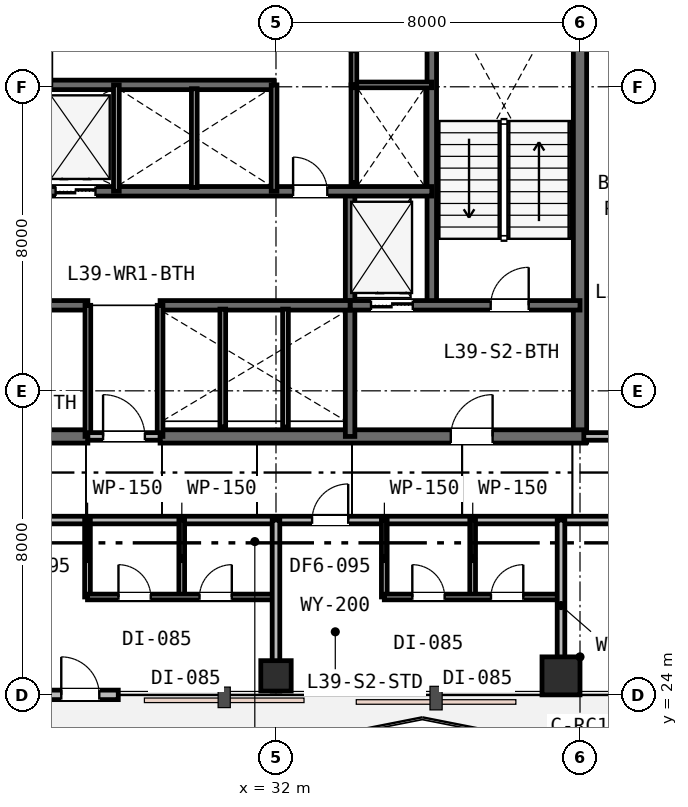
"""IFC4 building model, lengths in metres.
Left out: names, types, materials, properties, quantities, classifications, styles, units other than length and angle.
Written with IfcOpenShell. Run it as: python <this file> out.ifc"""

import sys

from ifc_helpers import new_model, si_unit, direction, frame, frame_2d, origin, origin_2d, place, context, subcontext, project, spatial, rectangle, extrude, element, fill, save


model = new_model("IFC4")
c1 = context("Model", 3, precision=1e-05, world=origin(), true_north=direction((0.0, 1.0)))
c2 = subcontext(c1, "Body", "Model", "MODEL_VIEW")
j1 = project(units=[si_unit("LENGTHUNIT", "METRE"), si_unit("PLANEANGLEUNIT", "RADIAN")], contexts=[c1])
p1 = place(None, origin())
s1 = spatial("IfcSite", under=j1, at=p1, CompositionType="ELEMENT")
p2 = place(p1, origin())
s2 = spatial("IfcBuilding", under=s1, at=p2, CompositionType="ELEMENT")
p3 = place(p2, frame((0.0, 0.0, 154.2)))
s3 = spatial("IfcBuildingStorey", under=s2, at=p3, CompositionType="ELEMENT", Elevation=154.2)
p4 = place(p3, frame((40.0, 30.65, 0.0), z_axis=(0.0, 0.0, 1.0), x_axis=(0.0, 1.0, 0.0)))
e1 = element("IfcWall", 1, at=p4, inside=s3, PredefinedType="SHEAR", context=c2, shape_type="SweptSolid", body=[
    extrude(rectangle(XDim=12.3, YDim=0.35, at=frame_2d((6.15, 0.0))), origin(), (0.0, 0.0, 1.0), 3.6),
])
p5 = place(p3, frame((15.85, 30.8, 0.0), z_axis=(0.0, 0.0, 1.0), x_axis=(1.0, 0.0, 0.0)))
e2 = element("IfcWall", 2, at=p5, inside=s3, PredefinedType="SHEAR", context=c2, shape_type="SweptSolid", body=[
    extrude(rectangle(XDim=11.2, YDim=0.35, at=frame_2d((5.6, 0.0))), origin(), (0.0, 0.0, 1.0), 3.6),
])
p6 = place(p5, frame((2.45, 0.0, 0.0)))
e3 = element("IfcOpeningElement", 3, at=p6, cuts=e2, PredefinedType="OPENING", context=c2, shape_type="SweptSolid", body=[
    extrude(rectangle(XDim=1.1, YDim=2.15, at=frame_2d((0.55, 1.075))), frame((0.0, 0.185, 0.0), z_axis=(0.0, -1.0, 0.0), x_axis=(1.0, 0.0, 0.0)), (0.0, 0.0, 1.0), 0.37),
])
p7 = place(p3, frame((28.95, 30.8, 0.0), z_axis=(0.0, 0.0, 1.0), x_axis=(1.0, 0.0, 0.0)))
e4 = element("IfcWall", 4, at=p7, inside=s3, PredefinedType="SHEAR", context=c2, shape_type="SweptSolid", body=[
    extrude(rectangle(XDim=11.2, YDim=0.35, at=frame_2d((5.6, 0.0))), origin(), (0.0, 0.0, 1.0), 3.6),
])
p8 = place(p7, frame((7.65, 0.0, 0.0)))
e5 = element("IfcOpeningElement", 5, at=p8, cuts=e4, PredefinedType="OPENING", context=c2, shape_type="SweptSolid", body=[
    extrude(rectangle(XDim=1.1, YDim=2.15, at=frame_2d((0.55, 1.075))), frame((0.0, 0.185, 0.0), z_axis=(0.0, -1.0, 0.0), x_axis=(1.0, 0.0, 0.0)), (0.0, 0.0, 1.0), 0.37),
])
p9 = place(p3, frame((36.1, 34.25, 0.0), z_axis=(0.0, 0.0, 1.0), x_axis=(0.0, 1.0, 0.0)))
e6 = element("IfcWall", 6, at=p9, inside=s3, PredefinedType="SHEAR", context=c2, shape_type="SweptSolid", body=[
    extrude(rectangle(XDim=8.65, YDim=0.25, at=frame_2d((4.325, 0.0))), origin(), (0.0, 0.0, 1.0), 3.6),
])
p10 = place(p3, frame((33.95, 30.8, 0.0), z_axis=(0.0, 0.0, 1.0), x_axis=(0.0, 1.0, 0.0)))
e7 = element("IfcWall", 7, at=p10, inside=s3, PredefinedType="SHEAR", context=c2, shape_type="SweptSolid", body=[
    extrude(rectangle(XDim=6.45, YDim=0.25, at=frame_2d((3.225, 0.0))), origin(), (0.0, 0.0, 1.0), 3.6),
])
p11 = place(p3, frame((33.95, 34.25, 0.0), z_axis=(0.0, 0.0, 1.0), x_axis=(1.0, 0.0, 0.0)))
e8 = element("IfcWall", 8, at=p11, inside=s3, PredefinedType="SHEAR", context=c2, shape_type="SweptSolid", body=[
    extrude(rectangle(XDim=6.05, YDim=0.25, at=frame_2d((3.025, 0.0))), origin(), (0.0, 0.0, 1.0), 3.6),
])
p12 = place(p11, frame((3.7, 0.0, 0.0)))
e9 = element("IfcOpeningElement", 9, at=p12, cuts=e8, PredefinedType="OPENING", context=c2, shape_type="SweptSolid", body=[
    extrude(rectangle(XDim=1.0, YDim=2.15, at=frame_2d((0.5, 1.075))), frame((0.0, 0.135, 0.0), z_axis=(0.0, -1.0, 0.0), x_axis=(1.0, 0.0, 0.0)), (0.0, 0.0, 1.0), 0.27),
])
p13 = place(p11, frame((0.55, 0.0, 0.0)))
e10 = element("IfcOpeningElement", 10, at=p13, cuts=e8, PredefinedType="OPENING", context=c2, shape_type="SweptSolid", body=[
    extrude(rectangle(XDim=1.1, YDim=2.15, at=frame_2d((0.55, 1.075))), frame((0.0, 0.135, 0.0), z_axis=(0.0, -1.0, 0.0), x_axis=(1.0, 0.0, 0.0)), (0.0, 0.0, 1.0), 0.27),
])
p14 = place(p3, frame((22.05, 34.25, 0.0), z_axis=(0.0, 0.0, 1.0), x_axis=(1.0, 0.0, 0.0)))
e11 = element("IfcWall", 11, at=p14, inside=s3, PredefinedType="SHEAR", context=c2, shape_type="SweptSolid", body=[
    extrude(rectangle(XDim=5.0, YDim=0.25, at=frame_2d((2.5, 0.0))), origin(), (0.0, 0.0, 1.0), 3.6),
])
p15 = place(p14, frame((1.95, 0.0, 0.0)))
e12 = element("IfcOpeningElement", 12, at=p15, cuts=e11, PredefinedType="OPENING", context=c2, shape_type="SweptSolid", body=[
    extrude(rectangle(XDim=1.0, YDim=2.15, at=frame_2d((0.5, 1.075))), frame((0.0, 0.135, 0.0), z_axis=(0.0, -1.0, 0.0), x_axis=(1.0, 0.0, 0.0)), (0.0, 0.0, 1.0), 0.27),
])
p16 = place(p3, frame((28.95, 34.25, 0.0), z_axis=(0.0, 0.0, 1.0), x_axis=(1.0, 0.0, 0.0)))
e13 = element("IfcWall", 13, at=p16, inside=s3, PredefinedType="SHEAR", context=c2, shape_type="SweptSolid", body=[
    extrude(rectangle(XDim=5.0, YDim=0.25, at=frame_2d((2.5, 0.0))), origin(), (0.0, 0.0, 1.0), 3.6),
])
p17 = place(p3, frame((19.9, 37.25, 0.0), z_axis=(0.0, 0.0, 1.0), x_axis=(1.0, 0.0, 0.0)))
e14 = element("IfcWall", 14, at=p17, inside=s3, PredefinedType="SHEAR", context=c2, shape_type="SweptSolid", body=[
    extrude(rectangle(XDim=16.2, YDim=0.25, at=frame_2d((8.1, 0.0))), origin(), (0.0, 0.0, 1.0), 3.6),
])
p18 = place(p17, frame((12.55, 0.0, 0.0)))
e15 = element("IfcOpeningElement", 15, at=p18, cuts=e14, PredefinedType="OPENING", context=c2, shape_type="SweptSolid", body=[
    extrude(rectangle(XDim=0.9, YDim=2.15, at=frame_2d((0.45, 1.075))), frame((0.0, 0.135, 0.0), z_axis=(0.0, -1.0, 0.0), x_axis=(1.0, 0.0, 0.0)), (0.0, 0.0, 1.0), 0.27),
])
p19 = place(p17, frame((2.5, 0.0, 0.0)))
e16 = element("IfcOpeningElement", 16, at=p19, cuts=e14, PredefinedType="OPENING", context=c2, shape_type="SweptSolid", body=[
    extrude(rectangle(XDim=1.05, YDim=2.15, at=frame_2d((0.525, 1.075))), frame((0.0, 0.135, 0.0), z_axis=(0.0, -1.0, 0.0), x_axis=(1.0, 0.0, 0.0)), (0.0, 0.0, 1.0), 0.27),
])
p20 = place(p17, frame((4.4, 0.0, 0.0)))
e17 = element("IfcOpeningElement", 17, at=p20, cuts=e14, PredefinedType="OPENING", context=c2, shape_type="SweptSolid", body=[
    extrude(rectangle(XDim=1.05, YDim=2.15, at=frame_2d((0.525, 1.075))), frame((0.0, 0.135, 0.0), z_axis=(0.0, -1.0, 0.0), x_axis=(1.0, 0.0, 0.0)), (0.0, 0.0, 1.0), 0.27),
])
p21 = place(p17, frame((6.3, 0.0, 0.0)))
e18 = element("IfcOpeningElement", 18, at=p21, cuts=e14, PredefinedType="OPENING", context=c2, shape_type="SweptSolid", body=[
    extrude(rectangle(XDim=1.05, YDim=2.15, at=frame_2d((0.525, 1.075))), frame((0.0, 0.135, 0.0), z_axis=(0.0, -1.0, 0.0), x_axis=(1.0, 0.0, 0.0)), (0.0, 0.0, 1.0), 0.27),
])
p22 = place(p3, frame((19.9, 40.05, 0.0), z_axis=(0.0, 0.0, 1.0), x_axis=(1.0, 0.0, 0.0)))
e19 = element("IfcWall", 19, at=p22, inside=s3, PredefinedType="SHEAR", context=c2, shape_type="SweptSolid", body=[
    extrude(rectangle(XDim=12.05, YDim=0.25, at=frame_2d((6.025, 0.0))), origin(), (0.0, 0.0, 1.0), 3.6),
])
p23 = place(p3, frame((32.0, 24.5, 0.0), z_axis=(0.0, 0.0, 1.0), x_axis=(1.0, 0.0, 0.0)))
e20 = element("IfcColumn", 20, at=p23, inside=s3, PredefinedType="COLUMN", context=c2, shape_type="SweptSolid", body=[
    extrude(rectangle(XDim=0.8, YDim=0.8, at=origin_2d()), origin(), (0.0, 0.0, 1.0), 3.6),
])
p24 = place(p3, frame((39.5, 24.5, 0.0), z_axis=(0.0, 0.0, 1.0), x_axis=(1.0, 0.0, 0.0)))
e21 = element("IfcColumn", 21, at=p24, inside=s3, PredefinedType="COLUMN", context=c2, shape_type="SweptSolid", body=[
    extrude(rectangle(XDim=1.0, YDim=1.0, at=origin_2d()), origin(), (0.0, 0.0, 1.0), 3.6),
])
p25 = place(p3, frame((25.85, 24.0, 0.0), z_axis=(0.0, 0.0, 1.0), x_axis=(1.0, 0.0, 0.0)))
e22 = element("IfcWall", 22, at=p25, inside=s3, PredefinedType="STANDARD", context=c2, shape_type="SweptSolid", body=[
    extrude(rectangle(XDim=2.0, YDim=0.25, at=frame_2d((1.0, 0.0))), origin(), (0.0, 0.0, 1.0), 3.01),
])
p26 = place(p25, frame((0.5, 0.0, 0.0)))
e23 = element("IfcOpeningElement", 23, at=p26, cuts=e22, PredefinedType="OPENING", context=c2, shape_type="SweptSolid", body=[
    extrude(rectangle(XDim=1.0, YDim=2.15, at=frame_2d((0.5, 1.075))), frame((0.0, 0.135, 0.0), z_axis=(0.0, -1.0, 0.0), x_axis=(1.0, 0.0, 0.0)), (0.0, 0.0, 1.0), 0.27),
])
for number, where, z_axis, x_axis in (
    (24, (27.05, 30.8, 0.0), (0.0, 0.0, 1.0), (0.0, 1.0, 0.0)),
    (25, (28.95, 30.8, 0.0), (0.0, 0.0, 1.0), (0.0, 1.0, 0.0)),
):
    element("IfcWall", number, at=place(p3, frame(where, z_axis=z_axis, x_axis=x_axis)), inside=s3, PredefinedType="PLUMBINGWALL", context=c2, shape_type="SweptSolid", body=[
        extrude(rectangle(XDim=3.45, YDim=0.15, at=frame_2d((1.725, 0.0))), origin(), (0.0, 0.0, 1.0), 2.96),
    ])
p27 = place(p3, frame((27.05, 30.8, 0.0), z_axis=(0.0, 0.0, 1.0), x_axis=(1.0, 0.0, 0.0)))
e26 = element("IfcWall", 26, at=p27, inside=s3, PredefinedType="PARTITIONING", context=c2, shape_type="SweptSolid", body=[
    extrude(rectangle(XDim=1.9, YDim=0.2, at=frame_2d((0.95, 0.0))), origin(), (0.0, 0.0, 1.0), 2.96),
])
p28 = place(p27, frame((0.4, 0.0, 0.0)))
e27 = element("IfcOpeningElement", 27, at=p28, cuts=e26, PredefinedType="OPENING", context=c2, shape_type="SweptSolid", body=[
    extrude(rectangle(XDim=1.1, YDim=2.15, at=frame_2d((0.55, 1.075))), frame((0.0, 0.11, 0.0), z_axis=(0.0, -1.0, 0.0), x_axis=(1.0, 0.0, 0.0)), (0.0, 0.0, 1.0), 0.22),
])
p29 = place(p3, frame((30.6, 31.05, 0.0), z_axis=(0.0, 0.0, 1.0), x_axis=(0.0, 1.0, 0.0)))
e28 = element("IfcWall", 28, at=p29, inside=s3, PredefinedType="PLUMBINGWALL", context=c2, shape_type="SweptSolid", body=[
    extrude(rectangle(XDim=3.1, YDim=0.15, at=frame_2d((1.55, 0.0))), origin(), (0.0, 0.0, 1.0), 3.33),
])
p30 = place(p3, frame((32.25, 31.05, 0.0), z_axis=(0.0, 0.0, 1.0), x_axis=(0.0, 1.0, 0.0)))
e29 = element("IfcWall", 29, at=p30, inside=s3, PredefinedType="PLUMBINGWALL", context=c2, shape_type="SweptSolid", body=[
    extrude(rectangle(XDim=3.1, YDim=0.15, at=frame_2d((1.55, 0.0))), origin(), (0.0, 0.0, 1.0), 2.93),
])
for number, where, z_axis, x_axis in (
    (30, (27.8, 37.25, 0.0), (0.0, 0.0, 1.0), (0.0, 1.0, 0.0)),
    (31, (31.95, 37.25, 0.0), (0.0, 0.0, 1.0), (0.0, 1.0, 0.0)),
):
    element("IfcWall", number, at=place(p3, frame(where, z_axis=z_axis, x_axis=x_axis)), inside=s3, PredefinedType="PLUMBINGWALL", context=c2, shape_type="SweptSolid", body=[
        extrude(rectangle(XDim=2.8, YDim=0.15, at=frame_2d((1.4, 0.0))), origin(), (0.0, 0.0, 1.0), 3.33),
    ])
p31 = place(p3, frame((29.85, 37.35, 0.0), z_axis=(0.0, 0.0, 1.0), x_axis=(0.0, 1.0, 0.0)))
e32 = element("IfcWall", 32, at=p31, inside=s3, PredefinedType="PLUMBINGWALL", context=c2, shape_type="SweptSolid", body=[
    extrude(rectangle(XDim=2.6, YDim=0.15, at=frame_2d((1.3, 0.0))), origin(), (0.0, 0.0, 1.0), 3.33),
])
p32 = place(p3, frame((34.05, 37.473, 0.0), z_axis=(0.0, 0.0, 1.0), x_axis=(0.0, 1.0, 0.0)))
e33 = element("IfcWall", 33, at=p32, inside=s3, PredefinedType="PLUMBINGWALL", context=c2, shape_type="SweptSolid", body=[
    extrude(rectangle(XDim=2.577, YDim=0.15, at=frame_2d((1.288, 0.0))), origin(), (0.0, 0.0, 1.0), 3.33),
])
p33 = place(p3, frame((34.05, 40.05, 0.0), z_axis=(0.0, 0.0, 1.0), x_axis=(1.0, 0.0, 0.0)))
e34 = element("IfcWall", 34, at=p33, inside=s3, PredefinedType="PARTITIONING", context=c2, shape_type="SweptSolid", body=[
    extrude(rectangle(XDim=2.05, YDim=0.15, at=frame_2d((1.025, 0.0))), origin(), (0.0, 0.0, 1.0), 3.33),
])
p34 = place(p3, frame((34.05, 40.05, 0.0), z_axis=(0.0, 0.0, 1.0), x_axis=(0.0, 1.0, 0.0)))
e35 = element("IfcWall", 35, at=p34, inside=s3, PredefinedType="PARTITIONING", context=c2, shape_type="SweptSolid", body=[
    extrude(rectangle(XDim=2.85, YDim=0.15, at=frame_2d((1.425, 0.0))), origin(), (0.0, 0.0, 1.0), 3.33),
])
p35 = place(p34, frame((0.865, 0.0, 0.0)))
e36 = element("IfcOpeningElement", 36, at=p35, cuts=e35, PredefinedType="OPENING", context=c2, shape_type="SweptSolid", body=[
    extrude(rectangle(XDim=0.9, YDim=2.15, at=frame_2d((0.45, 1.075))), frame((0.0, 0.085, 0.0), z_axis=(0.0, -1.0, 0.0), x_axis=(1.0, 0.0, 0.0)), (0.0, 0.0, 1.0), 0.17),
])
p36 = place(p3, frame((19.6, 28.6, 0.0), z_axis=(0.0, 0.0, 1.0), x_axis=(1.0, 0.0, 0.0)))
e37 = element("IfcWall", 37, at=p36, inside=s3, PredefinedType="PARTITIONING", context=c2, shape_type="SweptSolid", body=[
    extrude(rectangle(XDim=31.3, YDim=0.2, at=frame_2d((15.65, 0.0))), origin(), (0.0, 0.0, 1.0), 2.93),
])
p37 = place(p36, frame((5.445, 0.0, 0.0)))
e38 = element("IfcOpeningElement", 38, at=p37, cuts=e37, PredefinedType="OPENING", context=c2, shape_type="SweptSolid", body=[
    extrude(rectangle(XDim=0.95, YDim=2.15, at=frame_2d((0.475, 1.075))), frame((0.0, 0.11, 0.0), z_axis=(0.0, -1.0, 0.0), x_axis=(1.0, 0.0, 0.0)), (0.0, 0.0, 1.0), 0.22),
])
p38 = place(p36, frame((13.35, 0.0, 0.0)))
e39 = element("IfcOpeningElement", 39, at=p38, cuts=e37, PredefinedType="OPENING", context=c2, shape_type="SweptSolid", body=[
    extrude(rectangle(XDim=0.95, YDim=2.15, at=frame_2d((0.475, 1.075))), frame((0.0, 0.11, 0.0), z_axis=(0.0, -1.0, 0.0), x_axis=(1.0, 0.0, 0.0)), (0.0, 0.0, 1.0), 0.22),
])
p39 = place(p36, frame((21.925, 0.0, 0.0)))
e40 = element("IfcOpeningElement", 40, at=p39, cuts=e37, PredefinedType="OPENING", context=c2, shape_type="SweptSolid", body=[
    extrude(rectangle(XDim=0.95, YDim=2.15, at=frame_2d((0.475, 1.075))), frame((0.0, 0.11, 0.0), z_axis=(0.0, -1.0, 0.0), x_axis=(1.0, 0.0, 0.0)), (0.0, 0.0, 1.0), 0.22),
])
p40 = place(p3, frame((40.1, 30.8, 0.0), z_axis=(0.0, 0.0, 1.0), x_axis=(1.0, 0.0, 0.0)))
e41 = element("IfcWall", 41, at=p40, inside=s3, PredefinedType="PARTITIONING", context=c2, shape_type="SweptSolid", body=[
    extrude(rectangle(XDim=4.1, YDim=0.2, at=frame_2d((2.05, 0.0))), origin(), (0.0, 0.0, 1.0), 2.93),
])
p41 = place(p40, frame((1.575, 0.0, 0.0)))
e42 = element("IfcOpeningElement", 42, at=p41, cuts=e41, PredefinedType="OPENING", context=c2, shape_type="SweptSolid", body=[
    extrude(rectangle(XDim=0.95, YDim=2.15, at=frame_2d((0.475, 1.075))), frame((0.0, 0.11, 0.0), z_axis=(0.0, -1.0, 0.0), x_axis=(1.0, 0.0, 0.0)), (0.0, 0.0, 1.0), 0.22),
])
for number, where, z_axis, x_axis in (
    (43, (27.04, 26.576, 0.0), (0.0, 0.0, 1.0), (0.0, 1.0, 0.0)),
    (44, (29.52, 26.576, 0.0), (0.0, 0.0, 1.0), (0.0, 1.0, 0.0)),
):
    element("IfcWall", number, at=place(p3, frame(where, z_axis=z_axis, x_axis=x_axis)), inside=s3, PredefinedType="PARTITIONING", context=c2, shape_type="SweptSolid", body=[
        extrude(rectangle(XDim=2.024, YDim=0.15, at=frame_2d((1.012, 0.0))), origin(), (0.0, 0.0, 1.0), 2.96),
    ])
p42 = place(p3, frame((27.04, 26.576, 0.0), z_axis=(0.0, 0.0, 1.0), x_axis=(1.0, 0.0, 0.0)))
e45 = element("IfcWall", 45, at=p42, inside=s3, PredefinedType="PARTITIONING", context=c2, shape_type="SweptSolid", body=[
    extrude(rectangle(XDim=4.96, YDim=0.15, at=frame_2d((2.48, 0.0))), origin(), (0.0, 0.0, 1.0), 2.93),
])
p43 = place(p42, frame((0.815, 0.0, 0.0)))
e46 = element("IfcOpeningElement", 46, at=p43, cuts=e45, PredefinedType="OPENING", context=c2, shape_type="SweptSolid", body=[
    extrude(rectangle(XDim=0.85, YDim=2.15, at=frame_2d((0.425, 1.075))), frame((0.0, 0.085, 0.0), z_axis=(0.0, -1.0, 0.0), x_axis=(1.0, 0.0, 0.0)), (0.0, 0.0, 1.0), 0.17),
])
p44 = place(p42, frame((2.947, 0.0, 0.0)))
e47 = element("IfcOpeningElement", 47, at=p44, cuts=e45, PredefinedType="OPENING", context=c2, shape_type="SweptSolid", body=[
    extrude(rectangle(XDim=0.85, YDim=2.15, at=frame_2d((0.425, 1.075))), frame((0.0, 0.085, 0.0), z_axis=(0.0, -1.0, 0.0), x_axis=(1.0, 0.0, 0.0)), (0.0, 0.0, 1.0), 0.17),
])
p45 = place(p3, frame((32.0, 24.1, 0.0), z_axis=(0.0, 0.0, 1.0), x_axis=(0.0, 1.0, 0.0)))
e48 = element("IfcWall", 48, at=p45, inside=s3, PredefinedType="PARTITIONING", context=c2, shape_type="SweptSolid", body=[
    extrude(rectangle(XDim=4.5, YDim=0.2, at=frame_2d((2.25, 0.0))), origin(), (0.0, 0.0, 1.0), 2.93),
])
for number, where, z_axis, x_axis in (
    (49, (34.85, 26.576, 0.0), (0.0, 0.0, 1.0), (0.0, 1.0, 0.0)),
    (50, (37.175, 26.576, 0.0), (0.0, 0.0, 1.0), (0.0, 1.0, 0.0)),
):
    element("IfcWall", number, at=place(p3, frame(where, z_axis=z_axis, x_axis=x_axis)), inside=s3, PredefinedType="PARTITIONING", context=c2, shape_type="SweptSolid", body=[
        extrude(rectangle(XDim=2.024, YDim=0.15, at=frame_2d((1.012, 0.0))), origin(), (0.0, 0.0, 1.0), 2.96),
    ])
p46 = place(p3, frame((34.85, 26.576, 0.0), z_axis=(0.0, 0.0, 1.0), x_axis=(1.0, 0.0, 0.0)))
e51 = element("IfcWall", 51, at=p46, inside=s3, PredefinedType="PARTITIONING", context=c2, shape_type="SweptSolid", body=[
    extrude(rectangle(XDim=4.65, YDim=0.15, at=frame_2d((2.325, 0.0))), origin(), (0.0, 0.0, 1.0), 2.93),
])
p47 = place(p46, frame((0.738, 0.0, 0.0)))
e52 = element("IfcOpeningElement", 52, at=p47, cuts=e51, PredefinedType="OPENING", context=c2, shape_type="SweptSolid", body=[
    extrude(rectangle(XDim=0.85, YDim=2.15, at=frame_2d((0.425, 1.075))), frame((0.0, 0.085, 0.0), z_axis=(0.0, -1.0, 0.0), x_axis=(1.0, 0.0, 0.0)), (0.0, 0.0, 1.0), 0.17),
])
p48 = place(p46, frame((2.808, 0.0, 0.0)))
e53 = element("IfcOpeningElement", 53, at=p48, cuts=e51, PredefinedType="OPENING", context=c2, shape_type="SweptSolid", body=[
    extrude(rectangle(XDim=0.85, YDim=2.15, at=frame_2d((0.425, 1.075))), frame((0.0, 0.085, 0.0), z_axis=(0.0, -1.0, 0.0), x_axis=(1.0, 0.0, 0.0)), (0.0, 0.0, 1.0), 0.17),
])
p49 = place(p3, frame((39.5, 24.1, 0.0), z_axis=(0.0, 0.0, 1.0), x_axis=(0.0, 1.0, 0.0)))
e54 = element("IfcWall", 54, at=p49, inside=s3, PredefinedType="PARTITIONING", context=c2, shape_type="SweptSolid", body=[
    extrude(rectangle(XDim=4.5, YDim=0.2, at=frame_2d((2.25, 0.0))), origin(), (0.0, 0.0, 1.0), 2.93),
])
p50 = place(p26, origin())
e55 = element("IfcDoor", 55, at=p50, inside=s3, OperationType="SINGLE_SWING_LEFT", PredefinedType="DOOR", context=c2, shape_type="SweptSolid", body=[
    extrude(rectangle(XDim=1.0, YDim=2.15, at=frame_2d((0.5, 1.075))), frame((0.0, 0.025, 0.0), z_axis=(0.0, -1.0, 0.0), x_axis=(1.0, 0.0, 0.0)), (0.0, 0.0, 1.0), 0.05),
])
fill(e23, e55)
p51 = place(p28, origin())
e56 = element("IfcDoor", 56, at=p51, inside=s3, OperationType="SINGLE_SWING_LEFT", PredefinedType="DOOR", context=c2, shape_type="SweptSolid", body=[
    extrude(rectangle(XDim=1.1, YDim=2.15, at=frame_2d((0.55, 1.075))), frame((0.0, 0.025, 0.0), z_axis=(0.0, -1.0, 0.0), x_axis=(1.0, 0.0, 0.0)), (0.0, 0.0, 1.0), 0.05),
])
fill(e27, e56)
p52 = place(p12, origin())
e57 = element("IfcDoor", 57, at=p52, inside=s3, OperationType="SINGLE_SWING_RIGHT", PredefinedType="DOOR", context=c2, shape_type="SweptSolid", body=[
    extrude(rectangle(XDim=1.0, YDim=2.15, at=frame_2d((0.5, 1.075))), frame((0.0, 0.025, 0.0), z_axis=(0.0, -1.0, 0.0), x_axis=(1.0, 0.0, 0.0)), (0.0, 0.0, 1.0), 0.05),
])
fill(e9, e57)
p53 = place(p8, origin())
e58 = element("IfcDoor", 58, at=p53, inside=s3, OperationType="SINGLE_SWING_RIGHT", PredefinedType="DOOR", context=c2, shape_type="SweptSolid", body=[
    extrude(rectangle(XDim=1.1, YDim=2.15, at=frame_2d((0.55, 1.075))), frame((0.0, 0.025, 0.0), z_axis=(0.0, -1.0, 0.0), x_axis=(1.0, 0.0, 0.0)), (0.0, 0.0, 1.0), 0.05),
])
fill(e5, e58)
p54 = place(p18, origin())
e59 = element("IfcDoor", 59, at=p54, inside=s3, OperationType="SINGLE_SWING_LEFT", PredefinedType="DOOR", context=c2, shape_type="SweptSolid", body=[
    extrude(rectangle(XDim=0.9, YDim=2.15, at=frame_2d((0.45, 1.075))), frame((0.0, 0.025, 0.0), z_axis=(0.0, -1.0, 0.0), x_axis=(1.0, 0.0, 0.0)), (0.0, 0.0, 1.0), 0.05),
])
fill(e15, e59)
p55 = place(p43, origin())
e60 = element("IfcDoor", 60, at=p55, inside=s3, OperationType="SINGLE_SWING_LEFT", PredefinedType="DOOR", context=c2, shape_type="SweptSolid", body=[
    extrude(rectangle(XDim=0.85, YDim=2.15, at=frame_2d((0.425, 1.075))), frame((0.0, 0.025, 0.0), z_axis=(0.0, -1.0, 0.0), x_axis=(1.0, 0.0, 0.0)), (0.0, 0.0, 1.0), 0.05),
])
fill(e46, e60)
p56 = place(p44, origin())
e61 = element("IfcDoor", 61, at=p56, inside=s3, OperationType="SINGLE_SWING_RIGHT", PredefinedType="DOOR", context=c2, shape_type="SweptSolid", body=[
    extrude(rectangle(XDim=0.85, YDim=2.15, at=frame_2d((0.425, 1.075))), frame((0.0, 0.025, 0.0), z_axis=(0.0, -1.0, 0.0), x_axis=(1.0, 0.0, 0.0)), (0.0, 0.0, 1.0), 0.05),
])
fill(e47, e61)
p57 = place(p38, origin())
e62 = element("IfcDoor", 62, at=p57, inside=s3, OperationType="SINGLE_SWING_RIGHT", PredefinedType="DOOR", context=c2, shape_type="SweptSolid", body=[
    extrude(rectangle(XDim=0.95, YDim=2.15, at=frame_2d((0.475, 1.075))), frame((0.0, 0.025, 0.0), z_axis=(0.0, -1.0, 0.0), x_axis=(1.0, 0.0, 0.0)), (0.0, 0.0, 1.0), 0.05),
])
fill(e39, e62)
p58 = place(p47, origin())
e63 = element("IfcDoor", 63, at=p58, inside=s3, OperationType="SINGLE_SWING_LEFT", PredefinedType="DOOR", context=c2, shape_type="SweptSolid", body=[
    extrude(rectangle(XDim=0.85, YDim=2.15, at=frame_2d((0.425, 1.075))), frame((0.0, 0.025, 0.0), z_axis=(0.0, -1.0, 0.0), x_axis=(1.0, 0.0, 0.0)), (0.0, 0.0, 1.0), 0.05),
])
fill(e52, e63)
p59 = place(p48, origin())
e64 = element("IfcDoor", 64, at=p59, inside=s3, OperationType="SINGLE_SWING_RIGHT", PredefinedType="DOOR", context=c2, shape_type="SweptSolid", body=[
    extrude(rectangle(XDim=0.85, YDim=2.15, at=frame_2d((0.425, 1.075))), frame((0.0, 0.025, 0.0), z_axis=(0.0, -1.0, 0.0), x_axis=(1.0, 0.0, 0.0)), (0.0, 0.0, 1.0), 0.05),
])
fill(e53, e64)
p60 = place(p13, origin())
e65 = element("IfcDoor", 65, at=p60, inside=s3, OperationType="DOUBLE_DOOR_SLIDING", PredefinedType="DOOR", context=c2, shape_type="SweptSolid", body=[
    extrude(rectangle(XDim=1.1, YDim=2.15, at=frame_2d((0.55, 1.075))), frame((0.0, 0.025, 0.0), z_axis=(0.0, -1.0, 0.0), x_axis=(1.0, 0.0, 0.0)), (0.0, 0.0, 1.0), 0.05),
])
fill(e10, e65)
p61 = place(p21, origin())
e66 = element("IfcDoor", 66, at=p61, inside=s3, OperationType="DOUBLE_DOOR_SLIDING", PredefinedType="DOOR", context=c2, shape_type="SweptSolid", body=[
    extrude(rectangle(XDim=1.05, YDim=2.15, at=frame_2d((0.525, 1.075))), frame((0.0, 0.025, 0.0), z_axis=(0.0, -1.0, 0.0), x_axis=(1.0, 0.0, 0.0)), (0.0, 0.0, 1.0), 0.05),
])
fill(e18, e66)
save(model, sys.argv[1])
